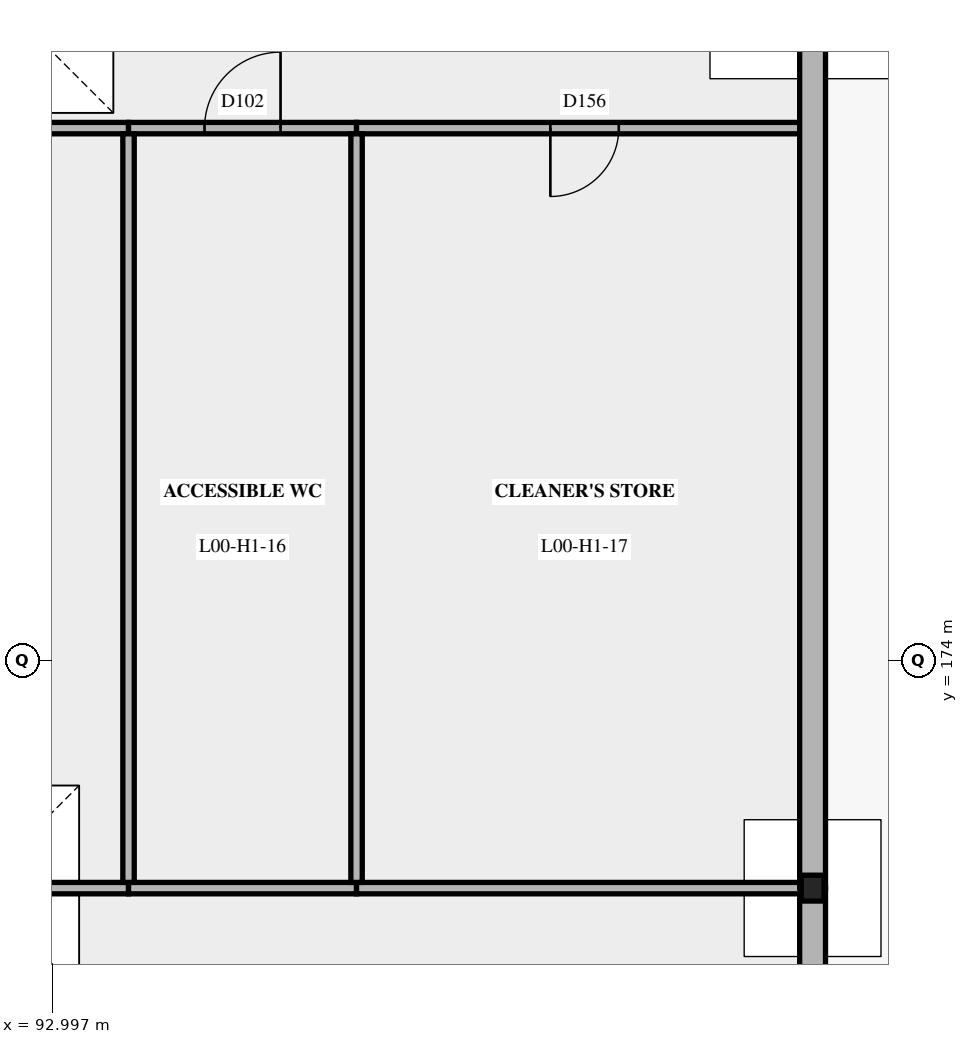
"""IFC4 building model, lengths in metres.
Left out: names, types, materials, properties, quantities, classifications, styles, units other than length and angle.
Written with IfcOpenShell. Run it as: python <this file> out.ifc"""

import sys

from ifc_helpers import new_model, si_unit, direction, frame, frame_2d, origin, origin_2d, place, context, subcontext, project, spatial, rectangle, i_section, extrude, element, fill, save


model = new_model("IFC4")
c1 = context("Model", 3, precision=1e-05, world=origin(), true_north=direction((0.0, 1.0)))
c2 = subcontext(c1, "Body", "Model", "MODEL_VIEW")
j1 = project(units=[si_unit("LENGTHUNIT", "METRE"), si_unit("PLANEANGLEUNIT", "RADIAN")], contexts=[c1])
p1 = place(None, origin())
s1 = spatial("IfcSite", under=j1, at=p1, CompositionType="ELEMENT")
p2 = place(p1, origin())
s2 = spatial("IfcBuilding", under=s1, at=p2, CompositionType="ELEMENT")
p3 = place(p2, origin())
s3 = spatial("IfcBuildingStorey", under=s2, at=p3, CompositionType="ELEMENT", Elevation=0.0)
p4 = place(p3, frame((103.0, 171.0, 0.0), z_axis=(0.0, 0.0, 1.0), x_axis=(1.0, 0.0, 0.0)))
e1 = element("IfcColumn", 1, at=p4, inside=s3, PredefinedType="COLUMN", context=c2, shape_type="SweptSolid", body=[
    extrude(i_section(OverallWidth=0.3, OverallDepth=0.34, WebThickness=0.012, FlangeThickness=0.021, at=origin_2d()), origin(), (0.0, 0.0, 1.0), 4.65),
])
p5 = place(p3, frame((103.0, 32.885, 0.0), z_axis=(0.0, 0.0, 1.0), x_axis=(0.0, 1.0, 0.0)))
e2 = element("IfcWall", 2, at=p5, inside=s3, PredefinedType="SOLIDWALL", context=c2, shape_type="SweptSolid", body=[
    extrude(rectangle(XDim=138.115, YDim=0.34, at=frame_2d((69.058, 0.0))), origin(), (0.0, 0.0, 1.0), 5.4),
])
p6 = place(p5, frame((16.015, 0.0, 0.0), z_axis=(0.0, 0.0, 1.0), x_axis=(-1.0, 0.0, 0.0)))
e3 = element("IfcOpeningElement", 3, at=p6, cuts=e2, PredefinedType="OPENING", context=c2, shape_type="SweptSolid", body=[
    extrude(rectangle(XDim=1.8, YDim=2.1, at=frame_2d((0.9, 1.05))), frame((0.0, 0.18, 0.0), z_axis=(0.0, -1.0, 0.0), x_axis=(1.0, 0.0, 0.0)), (0.0, 0.0, 1.0), 0.36),
])
p7 = place(p5, frame((20.415, 0.0, 0.0), z_axis=(0.0, 0.0, 1.0), x_axis=(-1.0, 0.0, 0.0)))
e4 = element("IfcOpeningElement", 4, at=p7, cuts=e2, PredefinedType="OPENING", context=c2, shape_type="SweptSolid", body=[
    extrude(rectangle(XDim=1.0, YDim=2.1, at=frame_2d((0.5, 1.05))), frame((0.0, 0.18, 0.0), z_axis=(0.0, -1.0, 0.0), x_axis=(1.0, 0.0, 0.0)), (0.0, 0.0, 1.0), 0.36),
])
p8 = place(p5, frame((28.015, 0.0, 0.0), z_axis=(0.0, 0.0, 1.0), x_axis=(-1.0, 0.0, 0.0)))
e5 = element("IfcOpeningElement", 5, at=p8, cuts=e2, PredefinedType="OPENING", context=c2, shape_type="SweptSolid", body=[
    extrude(rectangle(XDim=1.8, YDim=2.1, at=frame_2d((0.9, 1.05))), frame((0.0, 0.18, 0.0), z_axis=(0.0, -1.0, 0.0), x_axis=(1.0, 0.0, 0.0)), (0.0, 0.0, 1.0), 0.36),
])
p9 = place(p5, frame((40.015, 0.0, 0.0), z_axis=(0.0, 0.0, 1.0), x_axis=(-1.0, 0.0, 0.0)))
e6 = element("IfcOpeningElement", 6, at=p9, cuts=e2, PredefinedType="OPENING", context=c2, shape_type="SweptSolid", body=[
    extrude(rectangle(XDim=1.8, YDim=2.1, at=frame_2d((0.9, 1.05))), frame((0.0, 0.18, 0.0), z_axis=(0.0, -1.0, 0.0), x_axis=(1.0, 0.0, 0.0)), (0.0, 0.0, 1.0), 0.36),
])
p10 = place(p5, frame((44.415, 0.0, 0.0), z_axis=(0.0, 0.0, 1.0), x_axis=(-1.0, 0.0, 0.0)))
e7 = element("IfcOpeningElement", 7, at=p10, cuts=e2, PredefinedType="OPENING", context=c2, shape_type="SweptSolid", body=[
    extrude(rectangle(XDim=1.0, YDim=2.1, at=frame_2d((0.5, 1.05))), frame((0.0, 0.18, 0.0), z_axis=(0.0, -1.0, 0.0), x_axis=(1.0, 0.0, 0.0)), (0.0, 0.0, 1.0), 0.36),
])
p11 = place(p5, frame((52.015, 0.0, 0.0), z_axis=(0.0, 0.0, 1.0), x_axis=(-1.0, 0.0, 0.0)))
e8 = element("IfcOpeningElement", 8, at=p11, cuts=e2, PredefinedType="OPENING", context=c2, shape_type="SweptSolid", body=[
    extrude(rectangle(XDim=1.8, YDim=2.1, at=frame_2d((0.9, 1.05))), frame((0.0, 0.18, 0.0), z_axis=(0.0, -1.0, 0.0), x_axis=(1.0, 0.0, 0.0)), (0.0, 0.0, 1.0), 0.36),
])
p12 = place(p5, frame((64.015, 0.0, 0.0), z_axis=(0.0, 0.0, 1.0), x_axis=(-1.0, 0.0, 0.0)))
e9 = element("IfcOpeningElement", 9, at=p12, cuts=e2, PredefinedType="OPENING", context=c2, shape_type="SweptSolid", body=[
    extrude(rectangle(XDim=1.8, YDim=2.1, at=frame_2d((0.9, 1.05))), frame((0.0, 0.18, 0.0), z_axis=(0.0, -1.0, 0.0), x_axis=(1.0, 0.0, 0.0)), (0.0, 0.0, 1.0), 0.36),
])
p13 = place(p5, frame((68.415, 0.0, 0.0), z_axis=(0.0, 0.0, 1.0), x_axis=(-1.0, 0.0, 0.0)))
e10 = element("IfcOpeningElement", 10, at=p13, cuts=e2, PredefinedType="OPENING", context=c2, shape_type="SweptSolid", body=[
    extrude(rectangle(XDim=1.0, YDim=2.1, at=frame_2d((0.5, 1.05))), frame((0.0, 0.18, 0.0), z_axis=(0.0, -1.0, 0.0), x_axis=(1.0, 0.0, 0.0)), (0.0, 0.0, 1.0), 0.36),
])
p14 = place(p5, frame((76.015, 0.0, 0.0), z_axis=(0.0, 0.0, 1.0), x_axis=(-1.0, 0.0, 0.0)))
e11 = element("IfcOpeningElement", 11, at=p14, cuts=e2, PredefinedType="OPENING", context=c2, shape_type="SweptSolid", body=[
    extrude(rectangle(XDim=1.8, YDim=2.1, at=frame_2d((0.9, 1.05))), frame((0.0, 0.18, 0.0), z_axis=(0.0, -1.0, 0.0), x_axis=(1.0, 0.0, 0.0)), (0.0, 0.0, 1.0), 0.36),
])
p15 = place(p5, frame((88.015, 0.0, 0.0), z_axis=(0.0, 0.0, 1.0), x_axis=(-1.0, 0.0, 0.0)))
e12 = element("IfcOpeningElement", 12, at=p15, cuts=e2, PredefinedType="OPENING", context=c2, shape_type="SweptSolid", body=[
    extrude(rectangle(XDim=1.8, YDim=2.1, at=frame_2d((0.9, 1.05))), frame((0.0, 0.18, 0.0), z_axis=(0.0, -1.0, 0.0), x_axis=(1.0, 0.0, 0.0)), (0.0, 0.0, 1.0), 0.36),
])
p16 = place(p5, frame((92.415, 0.0, 0.0), z_axis=(0.0, 0.0, 1.0), x_axis=(-1.0, 0.0, 0.0)))
e13 = element("IfcOpeningElement", 13, at=p16, cuts=e2, PredefinedType="OPENING", context=c2, shape_type="SweptSolid", body=[
    extrude(rectangle(XDim=1.0, YDim=2.1, at=frame_2d((0.5, 1.05))), frame((0.0, 0.18, 0.0), z_axis=(0.0, -1.0, 0.0), x_axis=(1.0, 0.0, 0.0)), (0.0, 0.0, 1.0), 0.36),
])
p17 = place(p5, frame((100.015, 0.0, 0.0), z_axis=(0.0, 0.0, 1.0), x_axis=(-1.0, 0.0, 0.0)))
e14 = element("IfcOpeningElement", 14, at=p17, cuts=e2, PredefinedType="OPENING", context=c2, shape_type="SweptSolid", body=[
    extrude(rectangle(XDim=1.8, YDim=2.1, at=frame_2d((0.9, 1.05))), frame((0.0, 0.18, 0.0), z_axis=(0.0, -1.0, 0.0), x_axis=(1.0, 0.0, 0.0)), (0.0, 0.0, 1.0), 0.36),
])
p18 = place(p5, frame((112.015, 0.0, 0.0), z_axis=(0.0, 0.0, 1.0), x_axis=(-1.0, 0.0, 0.0)))
e15 = element("IfcOpeningElement", 15, at=p18, cuts=e2, PredefinedType="OPENING", context=c2, shape_type="SweptSolid", body=[
    extrude(rectangle(XDim=1.8, YDim=2.1, at=frame_2d((0.9, 1.05))), frame((0.0, 0.18, 0.0), z_axis=(0.0, -1.0, 0.0), x_axis=(1.0, 0.0, 0.0)), (0.0, 0.0, 1.0), 0.36),
])
p19 = place(p5, frame((116.415, 0.0, 0.0), z_axis=(0.0, 0.0, 1.0), x_axis=(-1.0, 0.0, 0.0)))
e16 = element("IfcOpeningElement", 16, at=p19, cuts=e2, PredefinedType="OPENING", context=c2, shape_type="SweptSolid", body=[
    extrude(rectangle(XDim=1.0, YDim=2.1, at=frame_2d((0.5, 1.05))), frame((0.0, 0.18, 0.0), z_axis=(0.0, -1.0, 0.0), x_axis=(1.0, 0.0, 0.0)), (0.0, 0.0, 1.0), 0.36),
])
p20 = place(p5, frame((124.015, 0.0, 0.0), z_axis=(0.0, 0.0, 1.0), x_axis=(-1.0, 0.0, 0.0)))
e17 = element("IfcOpeningElement", 17, at=p20, cuts=e2, PredefinedType="OPENING", context=c2, shape_type="SweptSolid", body=[
    extrude(rectangle(XDim=1.8, YDim=2.1, at=frame_2d((0.9, 1.05))), frame((0.0, 0.18, 0.0), z_axis=(0.0, -1.0, 0.0), x_axis=(1.0, 0.0, 0.0)), (0.0, 0.0, 1.0), 0.36),
])
p21 = place(p5, frame((136.015, 0.0, 0.0), z_axis=(0.0, 0.0, 1.0), x_axis=(-1.0, 0.0, 0.0)))
e18 = element("IfcOpeningElement", 18, at=p21, cuts=e2, PredefinedType="OPENING", context=c2, shape_type="SweptSolid", body=[
    extrude(rectangle(XDim=1.8, YDim=2.1, at=frame_2d((0.9, 1.05))), frame((0.0, 0.18, 0.0), z_axis=(0.0, -1.0, 0.0), x_axis=(1.0, 0.0, 0.0)), (0.0, 0.0, 1.0), 0.36),
])
p22 = place(p5, frame((0.9, 0.0, 0.9)))
e19 = element("IfcOpeningElement", 19, at=p22, cuts=e2, PredefinedType="OPENING", context=c2, shape_type="SweptSolid", body=[
    extrude(rectangle(XDim=1.2, YDim=3.3, at=frame_2d((0.6, 1.65))), frame((0.0, 0.18, 0.0), z_axis=(0.0, -1.0, 0.0), x_axis=(1.0, 0.0, 0.0)), (0.0, 0.0, 1.0), 0.36),
])
p23 = place(p5, frame((3.9, 0.0, 0.9)))
e20 = element("IfcOpeningElement", 20, at=p23, cuts=e2, PredefinedType="OPENING", context=c2, shape_type="SweptSolid", body=[
    extrude(rectangle(XDim=1.2, YDim=3.3, at=frame_2d((0.6, 1.65))), frame((0.0, 0.18, 0.0), z_axis=(0.0, -1.0, 0.0), x_axis=(1.0, 0.0, 0.0)), (0.0, 0.0, 1.0), 0.36),
])
p24 = place(p5, frame((6.9, 0.0, 0.9)))
e21 = element("IfcOpeningElement", 21, at=p24, cuts=e2, PredefinedType="OPENING", context=c2, shape_type="SweptSolid", body=[
    extrude(rectangle(XDim=1.2, YDim=3.3, at=frame_2d((0.6, 1.65))), frame((0.0, 0.18, 0.0), z_axis=(0.0, -1.0, 0.0), x_axis=(1.0, 0.0, 0.0)), (0.0, 0.0, 1.0), 0.36),
])
p25 = place(p5, frame((9.9, 0.0, 0.9)))
e22 = element("IfcOpeningElement", 22, at=p25, cuts=e2, PredefinedType="OPENING", context=c2, shape_type="SweptSolid", body=[
    extrude(rectangle(XDim=1.2, YDim=3.3, at=frame_2d((0.6, 1.65))), frame((0.0, 0.18, 0.0), z_axis=(0.0, -1.0, 0.0), x_axis=(1.0, 0.0, 0.0)), (0.0, 0.0, 1.0), 0.36),
])
p26 = place(p5, frame((21.9, 0.0, 0.9)))
e23 = element("IfcOpeningElement", 23, at=p26, cuts=e2, PredefinedType="OPENING", context=c2, shape_type="SweptSolid", body=[
    extrude(rectangle(XDim=1.2, YDim=3.3, at=frame_2d((0.6, 1.65))), frame((0.0, 0.18, 0.0), z_axis=(0.0, -1.0, 0.0), x_axis=(1.0, 0.0, 0.0)), (0.0, 0.0, 1.0), 0.36),
])
p27 = place(p5, frame((30.9, 0.0, 0.9)))
e24 = element("IfcOpeningElement", 24, at=p27, cuts=e2, PredefinedType="OPENING", context=c2, shape_type="SweptSolid", body=[
    extrude(rectangle(XDim=1.2, YDim=3.3, at=frame_2d((0.6, 1.65))), frame((0.0, 0.18, 0.0), z_axis=(0.0, -1.0, 0.0), x_axis=(1.0, 0.0, 0.0)), (0.0, 0.0, 1.0), 0.36),
])
p28 = place(p5, frame((33.9, 0.0, 0.9)))
e25 = element("IfcOpeningElement", 25, at=p28, cuts=e2, PredefinedType="OPENING", context=c2, shape_type="SweptSolid", body=[
    extrude(rectangle(XDim=1.2, YDim=3.3, at=frame_2d((0.6, 1.65))), frame((0.0, 0.18, 0.0), z_axis=(0.0, -1.0, 0.0), x_axis=(1.0, 0.0, 0.0)), (0.0, 0.0, 1.0), 0.36),
])
p29 = place(p5, frame((45.9, 0.0, 0.9)))
e26 = element("IfcOpeningElement", 26, at=p29, cuts=e2, PredefinedType="OPENING", context=c2, shape_type="SweptSolid", body=[
    extrude(rectangle(XDim=1.2, YDim=3.3, at=frame_2d((0.6, 1.65))), frame((0.0, 0.18, 0.0), z_axis=(0.0, -1.0, 0.0), x_axis=(1.0, 0.0, 0.0)), (0.0, 0.0, 1.0), 0.36),
])
p30 = place(p5, frame((54.9, 0.0, 0.9)))
e27 = element("IfcOpeningElement", 27, at=p30, cuts=e2, PredefinedType="OPENING", context=c2, shape_type="SweptSolid", body=[
    extrude(rectangle(XDim=1.2, YDim=3.3, at=frame_2d((0.6, 1.65))), frame((0.0, 0.18, 0.0), z_axis=(0.0, -1.0, 0.0), x_axis=(1.0, 0.0, 0.0)), (0.0, 0.0, 1.0), 0.36),
])
p31 = place(p5, frame((57.9, 0.0, 0.9)))
e28 = element("IfcOpeningElement", 28, at=p31, cuts=e2, PredefinedType="OPENING", context=c2, shape_type="SweptSolid", body=[
    extrude(rectangle(XDim=1.2, YDim=3.3, at=frame_2d((0.6, 1.65))), frame((0.0, 0.18, 0.0), z_axis=(0.0, -1.0, 0.0), x_axis=(1.0, 0.0, 0.0)), (0.0, 0.0, 1.0), 0.36),
])
p32 = place(p5, frame((69.9, 0.0, 0.9)))
e29 = element("IfcOpeningElement", 29, at=p32, cuts=e2, PredefinedType="OPENING", context=c2, shape_type="SweptSolid", body=[
    extrude(rectangle(XDim=1.2, YDim=3.3, at=frame_2d((0.6, 1.65))), frame((0.0, 0.18, 0.0), z_axis=(0.0, -1.0, 0.0), x_axis=(1.0, 0.0, 0.0)), (0.0, 0.0, 1.0), 0.36),
])
p33 = place(p5, frame((78.9, 0.0, 0.9)))
e30 = element("IfcOpeningElement", 30, at=p33, cuts=e2, PredefinedType="OPENING", context=c2, shape_type="SweptSolid", body=[
    extrude(rectangle(XDim=1.2, YDim=3.3, at=frame_2d((0.6, 1.65))), frame((0.0, 0.18, 0.0), z_axis=(0.0, -1.0, 0.0), x_axis=(1.0, 0.0, 0.0)), (0.0, 0.0, 1.0), 0.36),
])
p34 = place(p5, frame((81.9, 0.0, 0.9)))
e31 = element("IfcOpeningElement", 31, at=p34, cuts=e2, PredefinedType="OPENING", context=c2, shape_type="SweptSolid", body=[
    extrude(rectangle(XDim=1.2, YDim=3.3, at=frame_2d((0.6, 1.65))), frame((0.0, 0.18, 0.0), z_axis=(0.0, -1.0, 0.0), x_axis=(1.0, 0.0, 0.0)), (0.0, 0.0, 1.0), 0.36),
])
p35 = place(p5, frame((93.9, 0.0, 0.9)))
e32 = element("IfcOpeningElement", 32, at=p35, cuts=e2, PredefinedType="OPENING", context=c2, shape_type="SweptSolid", body=[
    extrude(rectangle(XDim=1.2, YDim=3.3, at=frame_2d((0.6, 1.65))), frame((0.0, 0.18, 0.0), z_axis=(0.0, -1.0, 0.0), x_axis=(1.0, 0.0, 0.0)), (0.0, 0.0, 1.0), 0.36),
])
p36 = place(p5, frame((102.9, 0.0, 0.9)))
e33 = element("IfcOpeningElement", 33, at=p36, cuts=e2, PredefinedType="OPENING", context=c2, shape_type="SweptSolid", body=[
    extrude(rectangle(XDim=1.2, YDim=3.3, at=frame_2d((0.6, 1.65))), frame((0.0, 0.18, 0.0), z_axis=(0.0, -1.0, 0.0), x_axis=(1.0, 0.0, 0.0)), (0.0, 0.0, 1.0), 0.36),
])
p37 = place(p5, frame((105.9, 0.0, 0.9)))
e34 = element("IfcOpeningElement", 34, at=p37, cuts=e2, PredefinedType="OPENING", context=c2, shape_type="SweptSolid", body=[
    extrude(rectangle(XDim=1.2, YDim=3.3, at=frame_2d((0.6, 1.65))), frame((0.0, 0.18, 0.0), z_axis=(0.0, -1.0, 0.0), x_axis=(1.0, 0.0, 0.0)), (0.0, 0.0, 1.0), 0.36),
])
p38 = place(p5, frame((117.9, 0.0, 0.9)))
e35 = element("IfcOpeningElement", 35, at=p38, cuts=e2, PredefinedType="OPENING", context=c2, shape_type="SweptSolid", body=[
    extrude(rectangle(XDim=1.2, YDim=3.3, at=frame_2d((0.6, 1.65))), frame((0.0, 0.18, 0.0), z_axis=(0.0, -1.0, 0.0), x_axis=(1.0, 0.0, 0.0)), (0.0, 0.0, 1.0), 0.36),
])
p39 = place(p5, frame((126.9, 0.0, 0.9)))
e36 = element("IfcOpeningElement", 36, at=p39, cuts=e2, PredefinedType="OPENING", context=c2, shape_type="SweptSolid", body=[
    extrude(rectangle(XDim=1.2, YDim=3.3, at=frame_2d((0.6, 1.65))), frame((0.0, 0.18, 0.0), z_axis=(0.0, -1.0, 0.0), x_axis=(1.0, 0.0, 0.0)), (0.0, 0.0, 1.0), 0.36),
])
p40 = place(p5, frame((129.9, 0.0, 0.9)))
e37 = element("IfcOpeningElement", 37, at=p40, cuts=e2, PredefinedType="OPENING", context=c2, shape_type="SweptSolid", body=[
    extrude(rectangle(XDim=1.2, YDim=3.3, at=frame_2d((0.6, 1.65))), frame((0.0, 0.18, 0.0), z_axis=(0.0, -1.0, 0.0), x_axis=(1.0, 0.0, 0.0)), (0.0, 0.0, 1.0), 0.36),
])
p41 = place(p3, frame((86.5, 171.0, 0.0), z_axis=(0.0, 0.0, 1.0), x_axis=(1.0, 0.0, 0.0)))
e38 = element("IfcWall", 38, at=p41, inside=s3, PredefinedType="PARTITIONING", context=c2, shape_type="SweptSolid", body=[
    extrude(rectangle(XDim=7.5, YDim=0.15, at=frame_2d((3.75, 0.0))), origin(), (0.0, 0.0, 1.0), 4.65),
])
p42 = place(p3, frame((94.0, 171.0, 0.0), z_axis=(0.0, 0.0, 1.0), x_axis=(1.0, 0.0, 0.0)))
e39 = element("IfcWall", 39, at=p42, inside=s3, PredefinedType="PARTITIONING", context=c2, shape_type="SweptSolid", body=[
    extrude(rectangle(XDim=3.0, YDim=0.15, at=frame_2d((1.5, 0.0))), origin(), (0.0, 0.0, 1.0), 4.65),
])
p43 = place(p3, frame((97.0, 171.0, 0.0), z_axis=(0.0, 0.0, 1.0), x_axis=(1.0, 0.0, 0.0)))
e40 = element("IfcWall", 40, at=p43, inside=s3, PredefinedType="PARTITIONING", context=c2, shape_type="SweptSolid", body=[
    extrude(rectangle(XDim=6.0, YDim=0.15, at=frame_2d((3.0, 0.0))), origin(), (0.0, 0.0, 1.0), 4.65),
])
p44 = place(p3, frame((86.5, 181.0, 0.0), z_axis=(0.0, 0.0, 1.0), x_axis=(1.0, 0.0, 0.0)))
e41 = element("IfcWall", 41, at=p44, inside=s3, PredefinedType="PARTITIONING", context=c2, shape_type="SweptSolid", body=[
    extrude(rectangle(XDim=7.5, YDim=0.15, at=frame_2d((3.75, 0.0))), origin(), (0.0, 0.0, 1.0), 5.15),
])
p45 = place(p44, frame((3.3, 0.0, 0.0)))
e42 = element("IfcOpeningElement", 42, at=p45, cuts=e41, PredefinedType="OPENING", context=c2, shape_type="SweptSolid", body=[
    extrude(rectangle(XDim=0.9, YDim=2.1, at=frame_2d((0.45, 1.05))), frame((0.0, 0.085, 0.0), z_axis=(0.0, -1.0, 0.0), x_axis=(1.0, 0.0, 0.0)), (0.0, 0.0, 1.0), 0.17),
])
p46 = place(p3, frame((94.0, 181.0, 0.0), z_axis=(0.0, 0.0, 1.0), x_axis=(1.0, 0.0, 0.0)))
e43 = element("IfcWall", 43, at=p46, inside=s3, PredefinedType="PARTITIONING", context=c2, shape_type="SweptSolid", body=[
    extrude(rectangle(XDim=3.0, YDim=0.15, at=frame_2d((1.5, 0.0))), origin(), (0.0, 0.0, 1.0), 5.15),
])
p47 = place(p46, frame((1.0, 0.0, 0.0)))
e44 = element("IfcOpeningElement", 44, at=p47, cuts=e43, PredefinedType="OPENING", context=c2, shape_type="SweptSolid", body=[
    extrude(rectangle(XDim=1.0, YDim=2.1, at=frame_2d((0.5, 1.05))), frame((0.0, 0.085, 0.0), z_axis=(0.0, -1.0, 0.0), x_axis=(1.0, 0.0, 0.0)), (0.0, 0.0, 1.0), 0.17),
])
p48 = place(p3, frame((97.0, 181.0, 0.0), z_axis=(0.0, 0.0, 1.0), x_axis=(1.0, 0.0, 0.0)))
e45 = element("IfcWall", 45, at=p48, inside=s3, PredefinedType="PARTITIONING", context=c2, shape_type="SweptSolid", body=[
    extrude(rectangle(XDim=6.0, YDim=0.15, at=frame_2d((3.0, 0.0))), origin(), (0.0, 0.0, 1.0), 5.15),
])
p49 = place(p48, frame((2.55, 0.0, 0.0)))
e46 = element("IfcOpeningElement", 46, at=p49, cuts=e45, PredefinedType="OPENING", context=c2, shape_type="SweptSolid", body=[
    extrude(rectangle(XDim=0.9, YDim=2.1, at=frame_2d((0.45, 1.05))), frame((0.0, 0.085, 0.0), z_axis=(0.0, -1.0, 0.0), x_axis=(1.0, 0.0, 0.0)), (0.0, 0.0, 1.0), 0.17),
])
for number, where, z_axis, x_axis in (
    (47, (94.0, 171.075, 0.0), (0.0, 0.0, 1.0), (0.0, 1.0, 0.0)),
    (48, (97.0, 171.075, 0.0), (0.0, 0.0, 1.0), (0.0, 1.0, 0.0)),
):
    element("IfcWall", number, at=place(p3, frame(where, z_axis=z_axis, x_axis=x_axis)), inside=s3, PredefinedType="PARTITIONING", context=c2, shape_type="SweptSolid", body=[
        extrude(rectangle(XDim=9.85, YDim=0.15, at=frame_2d((4.925, 0.0))), origin(), (0.0, 0.0, 1.0), 5.15),
    ])
p50 = place(p3, frame((103.0, 171.0, 0.0), z_axis=(0.0, 0.0, 1.0), x_axis=(0.0, 1.0, 0.0)))
e49 = element("IfcWall", 49, at=p50, inside=s3, PredefinedType="SOLIDWALL", context=c2, shape_type="SweptSolid", body=[
    extrude(rectangle(XDim=24.17, YDim=0.34, at=frame_2d((12.085, 0.0))), origin(), (0.0, 0.0, 1.0), 4.65),
])
p51 = place(p50, frame((15.1, 0.0, 0.0), z_axis=(0.0, 0.0, 1.0), x_axis=(-1.0, 0.0, 0.0)))
e50 = element("IfcOpeningElement", 50, at=p51, cuts=e49, PredefinedType="OPENING", context=c2, shape_type="SweptSolid", body=[
    extrude(rectangle(XDim=1.0, YDim=2.1, at=frame_2d((0.5, 1.05))), frame((0.0, 0.18, 0.0), z_axis=(0.0, -1.0, 0.0), x_axis=(1.0, 0.0, 0.0)), (0.0, 0.0, 1.0), 0.36),
])
p52 = place(p47, origin())
e51 = element("IfcDoor", 51, at=p52, inside=s3, OperationType="SINGLE_SWING_RIGHT", PredefinedType="DOOR", context=c2, shape_type="SweptSolid", body=[
    extrude(rectangle(XDim=1.0, YDim=2.1, at=frame_2d((0.5, 1.05))), frame((0.0, 0.025, 0.0), z_axis=(0.0, -1.0, 0.0), x_axis=(1.0, 0.0, 0.0)), (0.0, 0.0, 1.0), 0.05),
])
fill(e44, e51)
p53 = place(p49, origin())
e52 = element("IfcDoor", 52, at=p53, inside=s3, OperationType="SINGLE_SWING_RIGHT", PredefinedType="DOOR", context=c2, shape_type="SweptSolid", body=[
    extrude(rectangle(XDim=0.9, YDim=2.1, at=frame_2d((0.45, 1.05))), frame((0.0, 0.025, 0.0), z_axis=(0.0, -1.0, 0.0), x_axis=(1.0, 0.0, 0.0)), (0.0, 0.0, 1.0), 0.05),
])
fill(e46, e52)
save(model, sys.argv[1])
